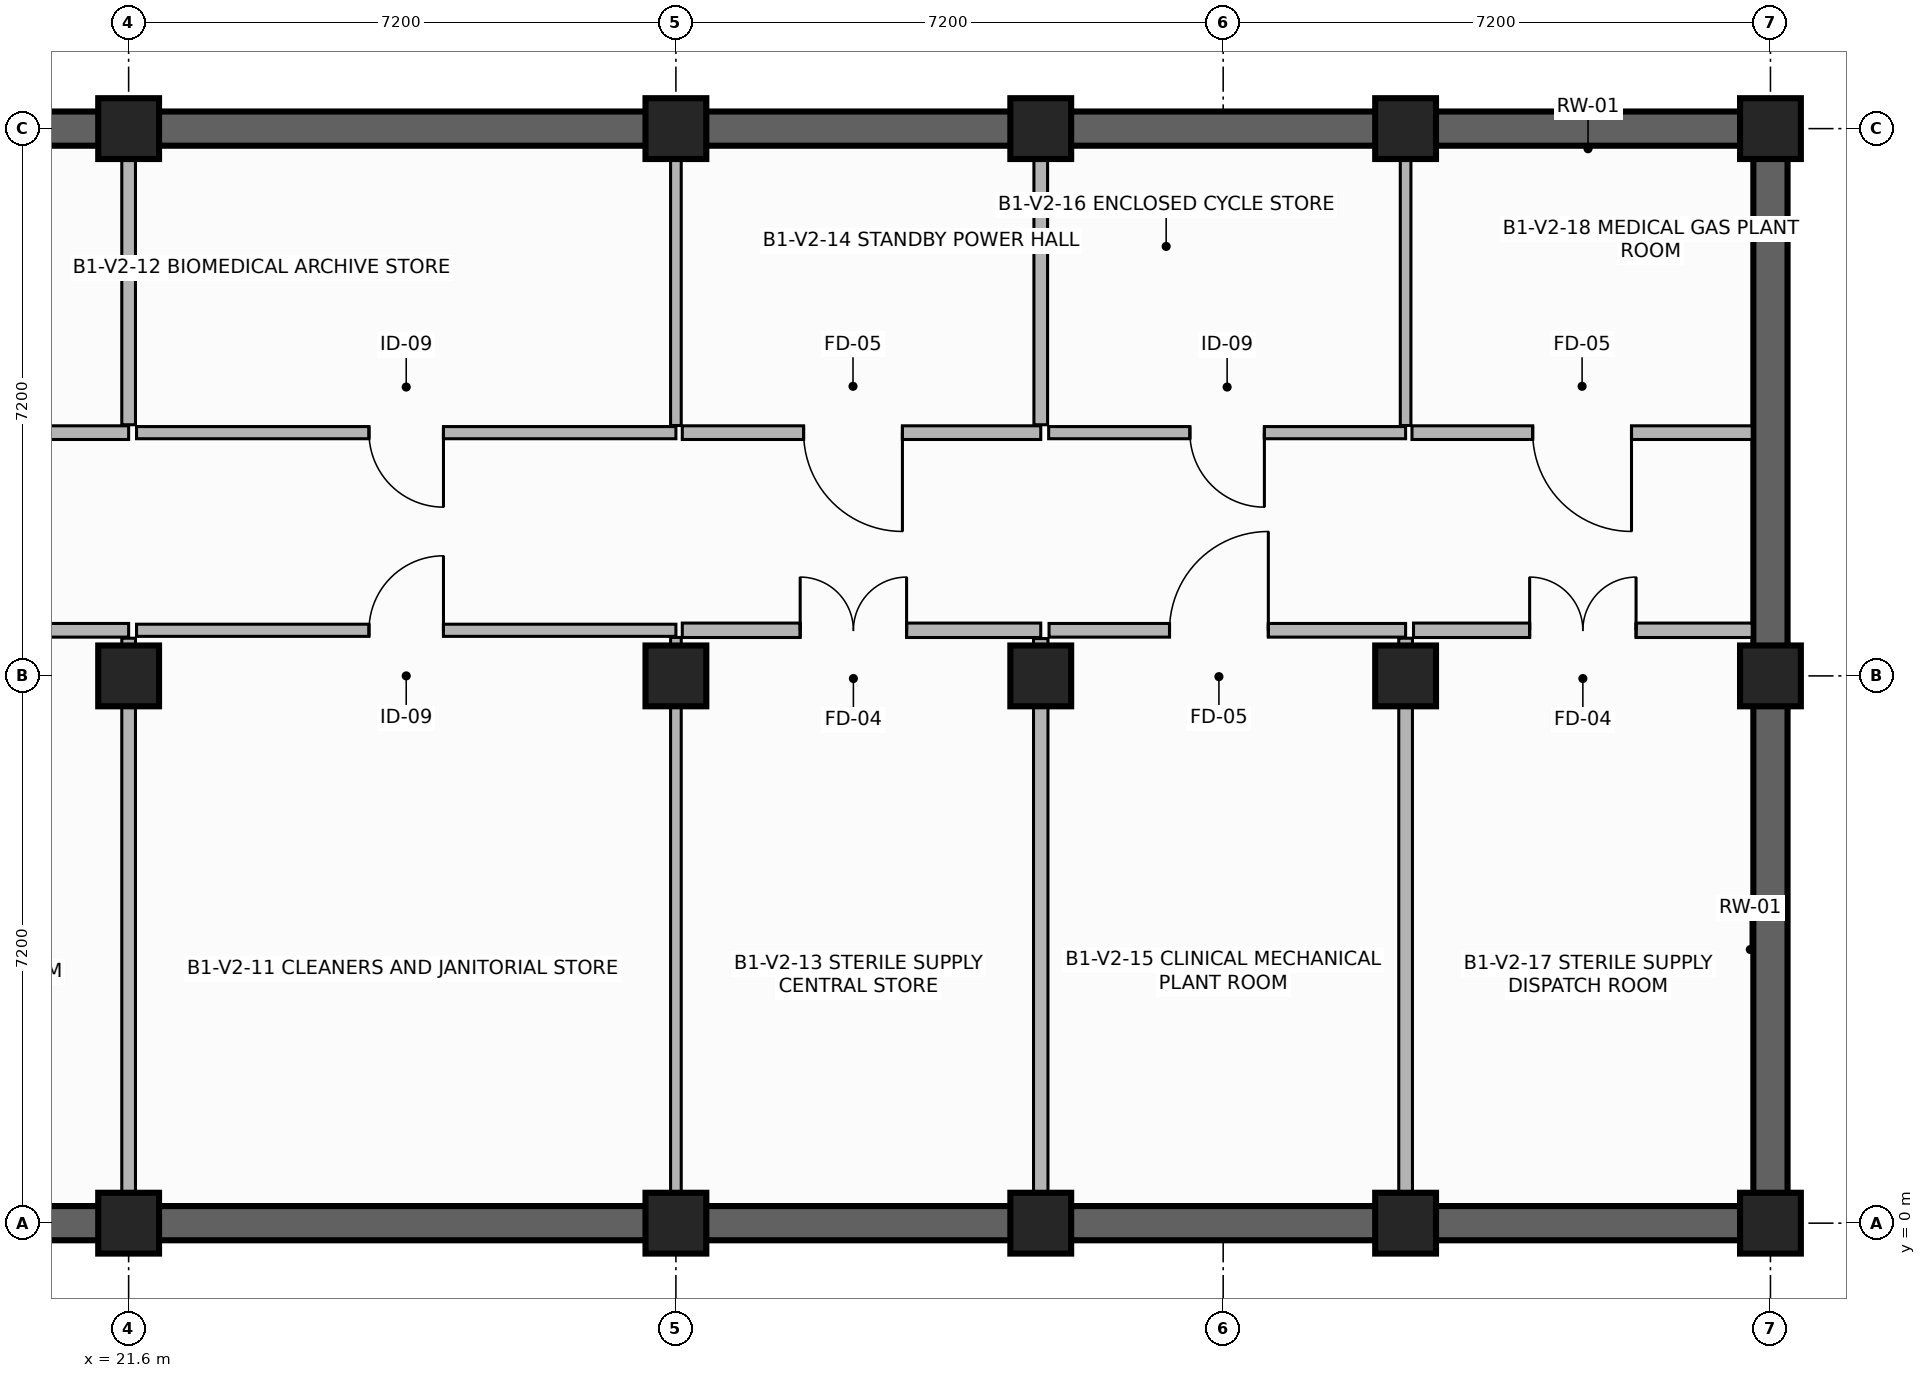
"""IFC4 building model, lengths in metres.
Left out: names, types, materials, properties, quantities, classifications, styles, units other than length and angle.
Written with IfcOpenShell. Run it as: python <this file> out.ifc"""

import sys

from ifc_helpers import new_model, si_unit, direction, frame, frame_2d, origin, origin_2d, place, context, subcontext, project, spatial, rectangle, extrude, element, fill, save


model = new_model("IFC4")
c1 = context("Model", 3, precision=1e-05, world=origin(), true_north=direction((0.0, 1.0)))
c2 = subcontext(c1, "Body", "Model", "MODEL_VIEW")
j1 = project(units=[si_unit("LENGTHUNIT", "METRE"), si_unit("PLANEANGLEUNIT", "RADIAN")], contexts=[c1])
p1 = place(None, origin())
s1 = spatial("IfcSite", under=j1, at=p1, CompositionType="ELEMENT")
p2 = place(p1, origin())
s2 = spatial("IfcBuilding", under=s1, at=p2, CompositionType="ELEMENT")
p3 = place(p2, frame((0.0, 0.0, -4.2)))
s3 = spatial("IfcBuildingStorey", under=s2, at=p3, CompositionType="ELEMENT", Elevation=-4.2)
for number, where, z_axis, x_axis in (
    (1, (21.6, 0.0, -0.4), (0.0, 0.0, 1.0), (1.0, 0.0, 0.0)),
    (2, (21.6, 7.2, -0.4), (0.0, 0.0, 1.0), (1.0, 0.0, 0.0)),
    (3, (21.6, 14.4, -0.4), (0.0, 0.0, 1.0), (1.0, 0.0, 0.0)),
    (4, (28.8, 0.0, -0.4), (0.0, 0.0, 1.0), (1.0, 0.0, 0.0)),
    (5, (28.8, 7.2, -0.4), (0.0, 0.0, 1.0), (1.0, 0.0, 0.0)),
    (6, (28.8, 14.4, -0.4), (0.0, 0.0, 1.0), (1.0, 0.0, 0.0)),
    (7, (33.6, 0.0, -0.4), (0.0, 0.0, 1.0), (1.0, 0.0, 0.0)),
    (8, (33.6, 7.2, -0.4), (0.0, 0.0, 1.0), (1.0, 0.0, 0.0)),
    (9, (33.6, 14.4, -0.4), (0.0, 0.0, 1.0), (1.0, 0.0, 0.0)),
    (10, (38.4, 0.0, -0.4), (0.0, 0.0, 1.0), (1.0, 0.0, 0.0)),
    (11, (38.4, 7.2, -0.4), (0.0, 0.0, 1.0), (1.0, 0.0, 0.0)),
    (12, (38.4, 14.4, -0.4), (0.0, 0.0, 1.0), (1.0, 0.0, 0.0)),
    (13, (43.2, 0.0, -0.4), (0.0, 0.0, 1.0), (1.0, 0.0, 0.0)),
    (14, (43.2, 7.2, -0.4), (0.0, 0.0, 1.0), (1.0, 0.0, 0.0)),
    (15, (43.2, 14.4, -0.4), (0.0, 0.0, 1.0), (1.0, 0.0, 0.0)),
):
    element("IfcColumn", number, at=place(p3, frame(where, z_axis=z_axis, x_axis=x_axis)), inside=s3, PredefinedType="COLUMN", context=c2, shape_type="SweptSolid", body=[
        extrude(rectangle(XDim=0.8, YDim=0.8, at=origin_2d()), origin(), (0.0, 0.0, 1.0), 4.32),
    ])
p4 = place(p3, frame((14.4, 0.0, 0.0), z_axis=(0.0, 0.0, 1.0), x_axis=(1.0, 0.0, 0.0)))
e16 = element("IfcWall", 16, at=p4, inside=s3, PredefinedType="ELEMENTEDWALL", context=c2, shape_type="SweptSolid", body=[
    extrude(rectangle(XDim=7.2, YDim=0.45, at=frame_2d((3.6, 0.0))), origin(), (0.0, 0.0, 1.0), 3.32),
])
p5 = place(p3, frame((21.6, 0.0, 0.0), z_axis=(0.0, 0.0, 1.0), x_axis=(1.0, 0.0, 0.0)))
e17 = element("IfcWall", 17, at=p5, inside=s3, PredefinedType="ELEMENTEDWALL", context=c2, shape_type="SweptSolid", body=[
    extrude(rectangle(XDim=7.2, YDim=0.45, at=frame_2d((3.6, 0.0))), origin(), (0.0, 0.0, 1.0), 3.32),
])
p6 = place(p3, frame((28.8, 0.0, 0.0), z_axis=(0.0, 0.0, 1.0), x_axis=(1.0, 0.0, 0.0)))
e18 = element("IfcWall", 18, at=p6, inside=s3, PredefinedType="ELEMENTEDWALL", context=c2, shape_type="SweptSolid", body=[
    extrude(rectangle(XDim=4.8, YDim=0.45, at=frame_2d((2.4, 0.0))), origin(), (0.0, 0.0, 1.0), 3.32),
])
p7 = place(p3, frame((33.6, 0.0, 0.0), z_axis=(0.0, 0.0, 1.0), x_axis=(1.0, 0.0, 0.0)))
e19 = element("IfcWall", 19, at=p7, inside=s3, PredefinedType="ELEMENTEDWALL", context=c2, shape_type="SweptSolid", body=[
    extrude(rectangle(XDim=4.8, YDim=0.45, at=frame_2d((2.4, 0.0))), origin(), (0.0, 0.0, 1.0), 3.32),
])
p8 = place(p3, frame((38.4, 0.0, 0.0), z_axis=(0.0, 0.0, 1.0), x_axis=(1.0, 0.0, 0.0)))
e20 = element("IfcWall", 20, at=p8, inside=s3, PredefinedType="ELEMENTEDWALL", context=c2, shape_type="SweptSolid", body=[
    extrude(rectangle(XDim=4.8, YDim=0.45, at=frame_2d((2.4, 0.0))), origin(), (0.0, 0.0, 1.0), 3.32),
])
for number, where, z_axis, x_axis in (
    (21, (43.2, 0.0, 0.0), (0.0, 0.0, 1.0), (0.0, 1.0, 0.0)),
    (22, (43.2, 7.2, 0.0), (0.0, 0.0, 1.0), (0.0, 1.0, 0.0)),
):
    element("IfcWall", number, at=place(p3, frame(where, z_axis=z_axis, x_axis=x_axis)), inside=s3, PredefinedType="ELEMENTEDWALL", context=c2, shape_type="SweptSolid", body=[
        extrude(rectangle(XDim=7.2, YDim=0.45, at=frame_2d((3.6, 0.0))), origin(), (0.0, 0.0, 1.0), 3.32),
    ])
p9 = place(p3, frame((43.2, 14.4, 0.0), z_axis=(0.0, 0.0, 1.0), x_axis=(-1.0, 0.0, 0.0)))
e23 = element("IfcWall", 23, at=p9, inside=s3, PredefinedType="ELEMENTEDWALL", context=c2, shape_type="SweptSolid", body=[
    extrude(rectangle(XDim=4.8, YDim=0.45, at=frame_2d((2.4, 0.0))), origin(), (0.0, 0.0, 1.0), 3.32),
])
p10 = place(p3, frame((38.4, 14.4, 0.0), z_axis=(0.0, 0.0, 1.0), x_axis=(-1.0, 0.0, 0.0)))
e24 = element("IfcWall", 24, at=p10, inside=s3, PredefinedType="ELEMENTEDWALL", context=c2, shape_type="SweptSolid", body=[
    extrude(rectangle(XDim=4.8, YDim=0.45, at=frame_2d((2.4, 0.0))), origin(), (0.0, 0.0, 1.0), 3.32),
])
p11 = place(p3, frame((33.6, 14.4, 0.0), z_axis=(0.0, 0.0, 1.0), x_axis=(-1.0, 0.0, 0.0)))
e25 = element("IfcWall", 25, at=p11, inside=s3, PredefinedType="ELEMENTEDWALL", context=c2, shape_type="SweptSolid", body=[
    extrude(rectangle(XDim=4.8, YDim=0.45, at=frame_2d((2.4, 0.0))), origin(), (0.0, 0.0, 1.0), 3.32),
])
p12 = place(p3, frame((28.8, 14.4, 0.0), z_axis=(0.0, 0.0, 1.0), x_axis=(-1.0, 0.0, 0.0)))
e26 = element("IfcWall", 26, at=p12, inside=s3, PredefinedType="ELEMENTEDWALL", context=c2, shape_type="SweptSolid", body=[
    extrude(rectangle(XDim=7.2, YDim=0.45, at=frame_2d((3.6, 0.0))), origin(), (0.0, 0.0, 1.0), 3.32),
])
p13 = place(p3, frame((21.6, 14.4, 0.0), z_axis=(0.0, 0.0, 1.0), x_axis=(-1.0, 0.0, 0.0)))
e27 = element("IfcWall", 27, at=p13, inside=s3, PredefinedType="ELEMENTEDWALL", context=c2, shape_type="SweptSolid", body=[
    extrude(rectangle(XDim=7.2, YDim=0.45, at=frame_2d((3.6, 0.0))), origin(), (0.0, 0.0, 1.0), 3.32),
])
p14 = place(p3, frame((14.504, 7.8, 0.0), z_axis=(0.0, 0.0, 1.0), x_axis=(1.0, 0.0, 0.0)))
e28 = element("IfcWall", 28, at=p14, inside=s3, PredefinedType="PARTITIONING", context=c2, shape_type="SweptSolid", body=[
    extrude(rectangle(XDim=7.096, YDim=0.18, at=frame_2d((3.548, 0.0))), origin(), (0.0, 0.0, 1.0), 3.26),
])
p15 = place(p14, frame((2.783, 0.0, 0.0)))
e29 = element("IfcOpeningElement", 29, at=p15, cuts=e28, PredefinedType="OPENING", context=c2, shape_type="SweptSolid", body=[
    extrude(rectangle(XDim=1.3, YDim=2.2, at=frame_2d((0.65, 1.1))), frame((0.0, 0.1, 0.0), z_axis=(0.0, -1.0, 0.0), x_axis=(1.0, 0.0, 0.0)), (0.0, 0.0, 1.0), 0.2),
])
p16 = place(p3, frame((21.6, 7.696, 0.0), z_axis=(0.0, 0.0, 1.0), x_axis=(0.0, -1.0, 0.0)))
e30 = element("IfcWall", 30, at=p16, inside=s3, PredefinedType="PARTITIONING", context=c2, shape_type="SweptSolid", body=[
    extrude(rectangle(XDim=7.456, YDim=0.18, at=frame_2d((3.728, 0.0))), origin(), (0.0, 0.0, 1.0), 3.26),
])
p17 = place(p3, frame((21.6, 10.4, 0.0), z_axis=(0.0, 0.0, 1.0), x_axis=(-1.0, 0.0, 0.0)))
e31 = element("IfcWall", 31, at=p17, inside=s3, PredefinedType="PARTITIONING", context=c2, shape_type="SweptSolid", body=[
    extrude(rectangle(XDim=7.2, YDim=0.18, at=frame_2d((3.6, 0.0))), origin(), (0.0, 0.0, 1.0), 3.26),
])
p18 = place(p17, frame((2.832, 0.0, 0.0)))
e32 = element("IfcOpeningElement", 32, at=p18, cuts=e31, PredefinedType="OPENING", context=c2, shape_type="SweptSolid", body=[
    extrude(rectangle(XDim=1.3, YDim=2.2, at=frame_2d((0.65, 1.1))), frame((0.0, 0.1, 0.0), z_axis=(0.0, -1.0, 0.0), x_axis=(1.0, 0.0, 0.0)), (0.0, 0.0, 1.0), 0.2),
])
p19 = place(p3, frame((21.6, 14.16, 0.0), z_axis=(0.0, 0.0, 1.0), x_axis=(0.0, -1.0, 0.0)))
e33 = element("IfcWall", 33, at=p19, inside=s3, PredefinedType="PARTITIONING", context=c2, shape_type="SweptSolid", body=[
    extrude(rectangle(XDim=3.656, YDim=0.18, at=frame_2d((1.828, 0.0))), origin(), (0.0, 0.0, 1.0), 3.26),
])
p20 = place(p3, frame((21.704, 7.8, 0.0), z_axis=(0.0, 0.0, 1.0), x_axis=(1.0, 0.0, 0.0)))
e34 = element("IfcWall", 34, at=p20, inside=s3, PredefinedType="PARTITIONING", context=c2, shape_type="SweptSolid", body=[
    extrude(rectangle(XDim=7.096, YDim=0.16, at=frame_2d((3.548, 0.0))), origin(), (0.0, 0.0, 1.0), 3.26),
])
p21 = place(p20, frame((3.058, 0.0, 0.0)))
e35 = element("IfcOpeningElement", 35, at=p21, cuts=e34, PredefinedType="OPENING", context=c2, shape_type="SweptSolid", body=[
    extrude(rectangle(XDim=0.98, YDim=2.15, at=frame_2d((0.49, 1.075))), frame((0.0, 0.09, 0.0), z_axis=(0.0, -1.0, 0.0), x_axis=(1.0, 0.0, 0.0)), (0.0, 0.0, 1.0), 0.18),
])
p22 = place(p3, frame((28.8, 7.706, 0.0), z_axis=(0.0, 0.0, 1.0), x_axis=(0.0, -1.0, 0.0)))
e36 = element("IfcWall", 36, at=p22, inside=s3, PredefinedType="PARTITIONING", context=c2, shape_type="SweptSolid", body=[
    extrude(rectangle(XDim=7.466, YDim=0.14, at=frame_2d((3.733, 0.0))), origin(), (0.0, 0.0, 1.0), 3.26),
])
p23 = place(p3, frame((28.8, 10.4, 0.0), z_axis=(0.0, 0.0, 1.0), x_axis=(-1.0, 0.0, 0.0)))
e37 = element("IfcWall", 37, at=p23, inside=s3, PredefinedType="PARTITIONING", context=c2, shape_type="SweptSolid", body=[
    extrude(rectangle(XDim=7.096, YDim=0.16, at=frame_2d((3.548, 0.0))), origin(), (0.0, 0.0, 1.0), 3.26),
])
p24 = place(p23, frame((3.058, 0.0, 0.0)))
e38 = element("IfcOpeningElement", 38, at=p24, cuts=e37, PredefinedType="OPENING", context=c2, shape_type="SweptSolid", body=[
    extrude(rectangle(XDim=0.98, YDim=2.15, at=frame_2d((0.49, 1.075))), frame((0.0, 0.09, 0.0), z_axis=(0.0, -1.0, 0.0), x_axis=(1.0, 0.0, 0.0)), (0.0, 0.0, 1.0), 0.18),
])
p25 = place(p3, frame((28.8, 14.16, 0.0), z_axis=(0.0, 0.0, 1.0), x_axis=(0.0, -1.0, 0.0)))
e39 = element("IfcWall", 39, at=p25, inside=s3, PredefinedType="PARTITIONING", context=c2, shape_type="SweptSolid", body=[
    extrude(rectangle(XDim=3.666, YDim=0.14, at=frame_2d((1.833, 0.0))), origin(), (0.0, 0.0, 1.0), 3.26),
])
p26 = place(p3, frame((28.884, 7.8, 0.0), z_axis=(0.0, 0.0, 1.0), x_axis=(1.0, 0.0, 0.0)))
e40 = element("IfcWall", 40, at=p26, inside=s3, PredefinedType="PARTITIONING", context=c2, shape_type="SweptSolid", body=[
    extrude(rectangle(XDim=4.716, YDim=0.19, at=frame_2d((2.358, 0.0))), origin(), (0.0, 0.0, 1.0), 3.26),
])
p27 = place(p26, frame((1.551, 0.0, 0.0)))
e41 = element("IfcOpeningElement", 41, at=p27, cuts=e40, PredefinedType="OPENING", context=c2, shape_type="SweptSolid", body=[
    extrude(rectangle(XDim=1.4, YDim=2.25, at=frame_2d((0.7, 1.125))), frame((0.0, 0.105, 0.0), z_axis=(0.0, -1.0, 0.0), x_axis=(1.0, 0.0, 0.0)), (0.0, 0.0, 1.0), 0.21),
])
p28 = place(p3, frame((33.6, 7.691, 0.0), z_axis=(0.0, 0.0, 1.0), x_axis=(0.0, -1.0, 0.0)))
e42 = element("IfcWall", 42, at=p28, inside=s3, PredefinedType="PARTITIONING", context=c2, shape_type="SweptSolid", body=[
    extrude(rectangle(XDim=7.451, YDim=0.19, at=frame_2d((3.726, 0.0))), origin(), (0.0, 0.0, 1.0), 3.26),
])
p29 = place(p3, frame((33.6, 10.4, 0.0), z_axis=(0.0, 0.0, 1.0), x_axis=(-1.0, 0.0, 0.0)))
e43 = element("IfcWall", 43, at=p29, inside=s3, PredefinedType="PARTITIONING", context=c2, shape_type="SweptSolid", body=[
    extrude(rectangle(XDim=4.716, YDim=0.18, at=frame_2d((2.358, 0.0))), origin(), (0.0, 0.0, 1.0), 3.26),
])
p30 = place(p29, frame((1.82, 0.0, 0.0)))
e44 = element("IfcOpeningElement", 44, at=p30, cuts=e43, PredefinedType="OPENING", context=c2, shape_type="SweptSolid", body=[
    extrude(rectangle(XDim=1.3, YDim=2.2, at=frame_2d((0.65, 1.1))), frame((0.0, 0.1, 0.0), z_axis=(0.0, -1.0, 0.0), x_axis=(1.0, 0.0, 0.0)), (0.0, 0.0, 1.0), 0.2),
])
p31 = place(p3, frame((33.6, 14.16, 0.0), z_axis=(0.0, 0.0, 1.0), x_axis=(0.0, -1.0, 0.0)))
e45 = element("IfcWall", 45, at=p31, inside=s3, PredefinedType="PARTITIONING", context=c2, shape_type="SweptSolid", body=[
    extrude(rectangle(XDim=3.656, YDim=0.18, at=frame_2d((1.828, 0.0))), origin(), (0.0, 0.0, 1.0), 3.26),
])
p32 = place(p3, frame((33.709, 7.8, 0.0), z_axis=(0.0, 0.0, 1.0), x_axis=(1.0, 0.0, 0.0)))
e46 = element("IfcWall", 46, at=p32, inside=s3, PredefinedType="PARTITIONING", context=c2, shape_type="SweptSolid", body=[
    extrude(rectangle(XDim=4.691, YDim=0.18, at=frame_2d((2.345, 0.0))), origin(), (0.0, 0.0, 1.0), 3.26),
])
p33 = place(p32, frame((1.585, 0.0, 0.0)))
e47 = element("IfcOpeningElement", 47, at=p33, cuts=e46, PredefinedType="OPENING", context=c2, shape_type="SweptSolid", body=[
    extrude(rectangle(XDim=1.3, YDim=2.2, at=frame_2d((0.65, 1.1))), frame((0.0, 0.1, 0.0), z_axis=(0.0, -1.0, 0.0), x_axis=(1.0, 0.0, 0.0)), (0.0, 0.0, 1.0), 0.2),
])
p34 = place(p3, frame((38.4, 7.696, 0.0), z_axis=(0.0, 0.0, 1.0), x_axis=(0.0, -1.0, 0.0)))
e48 = element("IfcWall", 48, at=p34, inside=s3, PredefinedType="PARTITIONING", context=c2, shape_type="SweptSolid", body=[
    extrude(rectangle(XDim=7.456, YDim=0.18, at=frame_2d((3.728, 0.0))), origin(), (0.0, 0.0, 1.0), 3.26),
])
p35 = place(p3, frame((38.4, 10.4, 0.0), z_axis=(0.0, 0.0, 1.0), x_axis=(-1.0, 0.0, 0.0)))
e49 = element("IfcWall", 49, at=p35, inside=s3, PredefinedType="PARTITIONING", context=c2, shape_type="SweptSolid", body=[
    extrude(rectangle(XDim=4.696, YDim=0.16, at=frame_2d((2.348, 0.0))), origin(), (0.0, 0.0, 1.0), 3.26),
])
p36 = place(p35, frame((1.858, 0.0, 0.0)))
e50 = element("IfcOpeningElement", 50, at=p36, cuts=e49, PredefinedType="OPENING", context=c2, shape_type="SweptSolid", body=[
    extrude(rectangle(XDim=0.98, YDim=2.15, at=frame_2d((0.49, 1.075))), frame((0.0, 0.09, 0.0), z_axis=(0.0, -1.0, 0.0), x_axis=(1.0, 0.0, 0.0)), (0.0, 0.0, 1.0), 0.18),
])
p37 = place(p3, frame((38.4, 14.16, 0.0), z_axis=(0.0, 0.0, 1.0), x_axis=(0.0, -1.0, 0.0)))
e51 = element("IfcWall", 51, at=p37, inside=s3, PredefinedType="PARTITIONING", context=c2, shape_type="SweptSolid", body=[
    extrude(rectangle(XDim=3.666, YDim=0.14, at=frame_2d((1.833, 0.0))), origin(), (0.0, 0.0, 1.0), 3.26),
])
p38 = place(p3, frame((38.504, 7.8, 0.0), z_axis=(0.0, 0.0, 1.0), x_axis=(1.0, 0.0, 0.0)))
e52 = element("IfcWall", 52, at=p38, inside=s3, PredefinedType="PARTITIONING", context=c2, shape_type="SweptSolid", body=[
    extrude(rectangle(XDim=4.456, YDim=0.19, at=frame_2d((2.228, 0.0))), origin(), (0.0, 0.0, 1.0), 3.26),
])
p39 = place(p38, frame((1.528, 0.0, 0.0)))
e53 = element("IfcOpeningElement", 53, at=p39, cuts=e52, PredefinedType="OPENING", context=c2, shape_type="SweptSolid", body=[
    extrude(rectangle(XDim=1.4, YDim=2.25, at=frame_2d((0.7, 1.125))), frame((0.0, 0.105, 0.0), z_axis=(0.0, -1.0, 0.0), x_axis=(1.0, 0.0, 0.0)), (0.0, 0.0, 1.0), 0.21),
])
p40 = place(p3, frame((42.96, 10.4, 0.0), z_axis=(0.0, 0.0, 1.0), x_axis=(-1.0, 0.0, 0.0)))
e54 = element("IfcWall", 54, at=p40, inside=s3, PredefinedType="PARTITIONING", context=c2, shape_type="SweptSolid", body=[
    extrude(rectangle(XDim=4.476, YDim=0.18, at=frame_2d((2.238, 0.0))), origin(), (0.0, 0.0, 1.0), 3.26),
])
p41 = place(p40, frame((1.588, 0.0, 0.0)))
e55 = element("IfcOpeningElement", 55, at=p41, cuts=e54, PredefinedType="OPENING", context=c2, shape_type="SweptSolid", body=[
    extrude(rectangle(XDim=1.3, YDim=2.2, at=frame_2d((0.65, 1.1))), frame((0.0, 0.1, 0.0), z_axis=(0.0, -1.0, 0.0), x_axis=(1.0, 0.0, 0.0)), (0.0, 0.0, 1.0), 0.2),
])
p42 = place(p21, origin())
e56 = element("IfcDoor", 56, at=p42, inside=s3, OperationType="SINGLE_SWING_RIGHT", PredefinedType="DOOR", context=c2, shape_type="SweptSolid", body=[
    extrude(rectangle(XDim=0.98, YDim=2.15, at=frame_2d((0.49, 1.075))), frame((0.0, 0.025, 0.0), z_axis=(0.0, -1.0, 0.0), x_axis=(1.0, 0.0, 0.0)), (0.0, 0.0, 1.0), 0.05),
])
fill(e35, e56)
p43 = place(p24, origin())
e57 = element("IfcDoor", 57, at=p43, inside=s3, OperationType="SINGLE_SWING_LEFT", PredefinedType="DOOR", context=c2, shape_type="SweptSolid", body=[
    extrude(rectangle(XDim=0.98, YDim=2.15, at=frame_2d((0.49, 1.075))), frame((0.0, 0.025, 0.0), z_axis=(0.0, -1.0, 0.0), x_axis=(1.0, 0.0, 0.0)), (0.0, 0.0, 1.0), 0.05),
])
fill(e38, e57)
p44 = place(p27, origin())
e58 = element("IfcDoor", 58, at=p44, inside=s3, OperationType="DOUBLE_DOOR_SINGLE_SWING", PredefinedType="DOOR", context=c2, shape_type="SweptSolid", body=[
    extrude(rectangle(XDim=1.4, YDim=2.25, at=frame_2d((0.7, 1.125))), frame((0.0, 0.025, 0.0), z_axis=(0.0, -1.0, 0.0), x_axis=(1.0, 0.0, 0.0)), (0.0, 0.0, 1.0), 0.05),
])
fill(e41, e58)
p45 = place(p30, origin())
e59 = element("IfcDoor", 59, at=p45, inside=s3, OperationType="SINGLE_SWING_LEFT", PredefinedType="DOOR", context=c2, shape_type="SweptSolid", body=[
    extrude(rectangle(XDim=1.3, YDim=2.2, at=frame_2d((0.65, 1.1))), frame((0.0, 0.025, 0.0), z_axis=(0.0, -1.0, 0.0), x_axis=(1.0, 0.0, 0.0)), (0.0, 0.0, 1.0), 0.05),
])
fill(e44, e59)
p46 = place(p33, origin())
e60 = element("IfcDoor", 60, at=p46, inside=s3, OperationType="SINGLE_SWING_RIGHT", PredefinedType="DOOR", context=c2, shape_type="SweptSolid", body=[
    extrude(rectangle(XDim=1.3, YDim=2.2, at=frame_2d((0.65, 1.1))), frame((0.0, 0.025, 0.0), z_axis=(0.0, -1.0, 0.0), x_axis=(1.0, 0.0, 0.0)), (0.0, 0.0, 1.0), 0.05),
])
fill(e47, e60)
p47 = place(p36, origin())
e61 = element("IfcDoor", 61, at=p47, inside=s3, OperationType="SINGLE_SWING_LEFT", PredefinedType="DOOR", context=c2, shape_type="SweptSolid", body=[
    extrude(rectangle(XDim=0.98, YDim=2.15, at=frame_2d((0.49, 1.075))), frame((0.0, 0.025, 0.0), z_axis=(0.0, -1.0, 0.0), x_axis=(1.0, 0.0, 0.0)), (0.0, 0.0, 1.0), 0.05),
])
fill(e50, e61)
p48 = place(p39, origin())
e62 = element("IfcDoor", 62, at=p48, inside=s3, OperationType="DOUBLE_DOOR_SINGLE_SWING", PredefinedType="DOOR", context=c2, shape_type="SweptSolid", body=[
    extrude(rectangle(XDim=1.4, YDim=2.25, at=frame_2d((0.7, 1.125))), frame((0.0, 0.025, 0.0), z_axis=(0.0, -1.0, 0.0), x_axis=(1.0, 0.0, 0.0)), (0.0, 0.0, 1.0), 0.05),
])
fill(e53, e62)
p49 = place(p41, origin())
e63 = element("IfcDoor", 63, at=p49, inside=s3, OperationType="SINGLE_SWING_LEFT", PredefinedType="DOOR", context=c2, shape_type="SweptSolid", body=[
    extrude(rectangle(XDim=1.3, YDim=2.2, at=frame_2d((0.65, 1.1))), frame((0.0, 0.025, 0.0), z_axis=(0.0, -1.0, 0.0), x_axis=(1.0, 0.0, 0.0)), (0.0, 0.0, 1.0), 0.05),
])
fill(e55, e63)
save(model, sys.argv[1])
